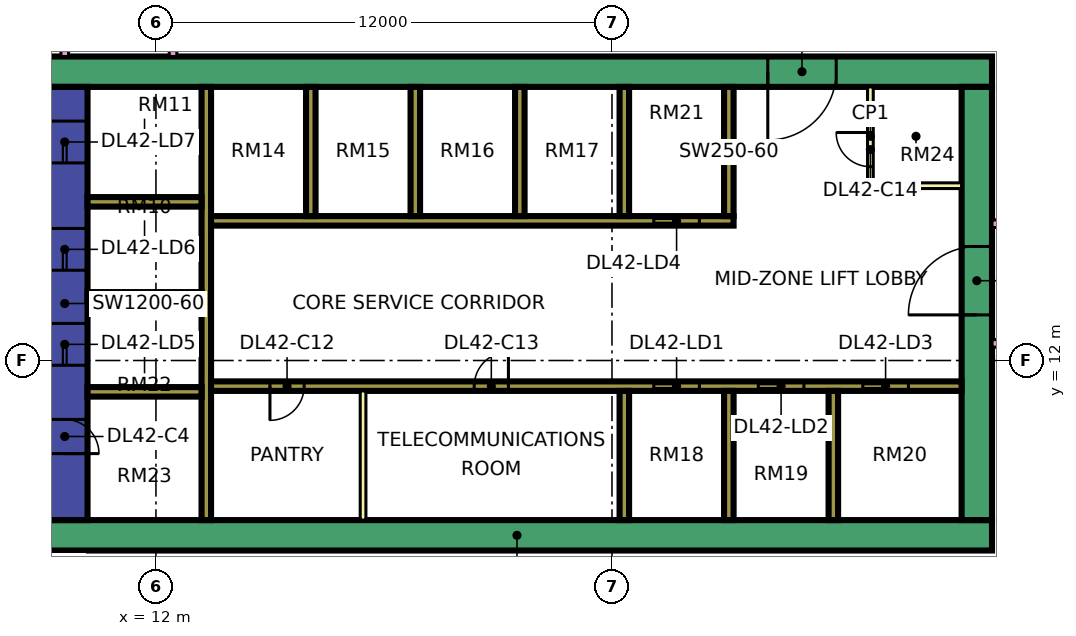
"""IFC4 building model, lengths in metres.
Left out: names, types, materials, properties, quantities, classifications, styles, units other than length and angle.
Written with IfcOpenShell. Run it as: python <this file> out.ifc"""

import sys

from ifc_helpers import new_model, si_unit, direction, frame, frame_2d, origin, place, context, subcontext, project, spatial, rectangle, extrude, element, fill, save


model = new_model("IFC4")
c1 = context("Model", 3, precision=1e-05, world=origin(), true_north=direction((0.0, 1.0)))
c2 = subcontext(c1, "Body", "Model", "MODEL_VIEW")
j1 = project(units=[si_unit("LENGTHUNIT", "METRE"), si_unit("PLANEANGLEUNIT", "RADIAN")], contexts=[c1])
p1 = place(None, origin())
s1 = spatial("IfcSite", under=j1, at=p1, CompositionType="ELEMENT")
p2 = place(p1, origin())
s2 = spatial("IfcBuilding", under=s1, at=p2, CompositionType="ELEMENT")
p3 = place(p2, frame((0.0, 0.0, 183.65)))
s3 = spatial("IfcBuildingStorey", under=s2, at=p3, CompositionType="ELEMENT", Elevation=183.65)
p4 = place(p3, frame((9.0, 7.4, 0.0), z_axis=(0.0, 0.0, 1.0), x_axis=(1.0, 0.0, 0.0)))
e1 = element("IfcWall", 1, at=p4, inside=s3, PredefinedType="SHEAR", context=c2, shape_type="SweptSolid", body=[
    extrude(rectangle(XDim=25.0, YDim=0.8, at=frame_2d((12.5, 0.0))), origin(), (0.0, 0.0, 1.0), 3.75),
])
p5 = place(p3, frame((9.0, 19.6, 0.0), z_axis=(0.0, 0.0, 1.0), x_axis=(1.0, 0.0, 0.0)))
e2 = element("IfcWall", 2, at=p5, inside=s3, PredefinedType="SHEAR", context=c2, shape_type="SweptSolid", body=[
    extrude(rectangle(XDim=25.0, YDim=0.8, at=frame_2d((12.5, 0.0))), origin(), (0.0, 0.0, 1.0), 3.75),
])
p6 = place(p5, frame((19.1, 0.0, 0.0)))
e3 = element("IfcOpeningElement", 3, at=p6, cuts=e2, PredefinedType="OPENING", context=c2, shape_type="SweptSolid", body=[
    extrude(rectangle(XDim=1.8, YDim=2.4, at=frame_2d((0.9, 1.2))), frame((0.0, 0.41, 0.0), z_axis=(0.0, -1.0, 0.0), x_axis=(1.0, 0.0, 0.0)), (0.0, 0.0, 1.0), 0.82),
])
p7 = place(p3, frame((9.6, 7.8, 0.0), z_axis=(0.0, 0.0, 1.0), x_axis=(0.0, 1.0, 0.0)))
e4 = element("IfcWall", 4, at=p7, inside=s3, PredefinedType="SHEAR", context=c2, shape_type="SweptSolid", body=[
    extrude(rectangle(XDim=11.4, YDim=1.2, at=frame_2d((5.7, 0.0))), origin(), (0.0, 0.0, 1.0), 3.75),
])
p8 = place(p7, frame((4.075, 0.0, 0.0)))
e5 = element("IfcOpeningElement", 5, at=p8, cuts=e4, PredefinedType="OPENING", context=c2, shape_type="SweptSolid", body=[
    extrude(rectangle(XDim=1.1, YDim=2.2, at=frame_2d((0.55, 1.1))), frame((0.0, 0.61, 0.0), z_axis=(0.0, -1.0, 0.0), x_axis=(1.0, 0.0, 0.0)), (0.0, 0.0, 1.0), 1.22),
])
p9 = place(p7, frame((6.575, 0.0, 0.0)))
e6 = element("IfcOpeningElement", 6, at=p9, cuts=e4, PredefinedType="OPENING", context=c2, shape_type="SweptSolid", body=[
    extrude(rectangle(XDim=1.1, YDim=2.2, at=frame_2d((0.55, 1.1))), frame((0.0, 0.61, 0.0), z_axis=(0.0, -1.0, 0.0), x_axis=(1.0, 0.0, 0.0)), (0.0, 0.0, 1.0), 1.22),
])
p10 = place(p7, frame((9.4, 0.0, 0.0)))
e7 = element("IfcOpeningElement", 7, at=p10, cuts=e4, PredefinedType="OPENING", context=c2, shape_type="SweptSolid", body=[
    extrude(rectangle(XDim=1.1, YDim=2.2, at=frame_2d((0.55, 1.1))), frame((0.0, 0.61, 0.0), z_axis=(0.0, -1.0, 0.0), x_axis=(1.0, 0.0, 0.0)), (0.0, 0.0, 1.0), 1.22),
])
p11 = place(p7, frame((1.75, 0.0, 0.0)))
e8 = element("IfcOpeningElement", 8, at=p11, cuts=e4, PredefinedType="OPENING", context=c2, shape_type="SweptSolid", body=[
    extrude(rectangle(XDim=0.9, YDim=2.1, at=frame_2d((0.45, 1.05))), frame((0.0, 0.61, 0.0), z_axis=(0.0, -1.0, 0.0), x_axis=(1.0, 0.0, 0.0)), (0.0, 0.0, 1.0), 1.22),
])
p12 = place(p3, frame((33.6, 7.8, 0.0), z_axis=(0.0, 0.0, 1.0), x_axis=(0.0, 1.0, 0.0)))
e9 = element("IfcWall", 9, at=p12, inside=s3, PredefinedType="SHEAR", context=c2, shape_type="SweptSolid", body=[
    extrude(rectangle(XDim=11.4, YDim=0.8, at=frame_2d((5.7, 0.0))), origin(), (0.0, 0.0, 1.0), 3.75),
])
p13 = place(p12, frame((5.4, 0.0, 0.0)))
e10 = element("IfcOpeningElement", 10, at=p13, cuts=e9, PredefinedType="OPENING", context=c2, shape_type="SweptSolid", body=[
    extrude(rectangle(XDim=1.8, YDim=2.4, at=frame_2d((0.9, 1.2))), frame((0.0, 0.41, 0.0), z_axis=(0.0, -1.0, 0.0), x_axis=(1.0, 0.0, 0.0)), (0.0, 0.0, 1.0), 0.82),
])
p14 = place(p3, frame((13.325, 7.8, 0.0), z_axis=(0.0, 0.0, 1.0), x_axis=(0.0, 1.0, 0.0)))
e11 = element("IfcWall", 11, at=p14, inside=s3, PredefinedType="SHEAR", context=c2, shape_type="SweptSolid", body=[
    extrude(rectangle(XDim=11.4, YDim=0.25, at=frame_2d((5.7, 0.0))), origin(), (0.0, 0.0, 1.0), 3.75),
])
p15 = place(p3, frame((13.45, 11.325, 0.0), z_axis=(0.0, 0.0, 1.0), x_axis=(1.0, 0.0, 0.0)))
e12 = element("IfcWall", 12, at=p15, inside=s3, PredefinedType="SHEAR", context=c2, shape_type="SweptSolid", body=[
    extrude(rectangle(XDim=19.75, YDim=0.25, at=frame_2d((9.875, 0.0))), origin(), (0.0, 0.0, 1.0), 3.75),
])
p16 = place(p15, frame((11.65, 0.0, 0.0)))
e13 = element("IfcOpeningElement", 13, at=p16, cuts=e12, PredefinedType="OPENING", context=c2, shape_type="SweptSolid", body=[
    extrude(rectangle(XDim=1.2, YDim=2.2, at=frame_2d((0.6, 1.1))), frame((0.0, 0.135, 0.0), z_axis=(0.0, -1.0, 0.0), x_axis=(1.0, 0.0, 0.0)), (0.0, 0.0, 1.0), 0.27),
])
p17 = place(p15, frame((14.4, 0.0, 0.0)))
e14 = element("IfcOpeningElement", 14, at=p17, cuts=e12, PredefinedType="OPENING", context=c2, shape_type="SweptSolid", body=[
    extrude(rectangle(XDim=1.2, YDim=2.2, at=frame_2d((0.6, 1.1))), frame((0.0, 0.135, 0.0), z_axis=(0.0, -1.0, 0.0), x_axis=(1.0, 0.0, 0.0)), (0.0, 0.0, 1.0), 0.27),
])
p18 = place(p15, frame((17.15, 0.0, 0.0)))
e15 = element("IfcOpeningElement", 15, at=p18, cuts=e12, PredefinedType="OPENING", context=c2, shape_type="SweptSolid", body=[
    extrude(rectangle(XDim=1.2, YDim=2.2, at=frame_2d((0.6, 1.1))), frame((0.0, 0.135, 0.0), z_axis=(0.0, -1.0, 0.0), x_axis=(1.0, 0.0, 0.0)), (0.0, 0.0, 1.0), 0.27),
])
p19 = place(p15, frame((1.55, 0.0, 0.0)))
e16 = element("IfcOpeningElement", 16, at=p19, cuts=e12, PredefinedType="OPENING", context=c2, shape_type="SweptSolid", body=[
    extrude(rectangle(XDim=0.9, YDim=2.1, at=frame_2d((0.45, 1.05))), frame((0.0, 0.135, 0.0), z_axis=(0.0, -1.0, 0.0), x_axis=(1.0, 0.0, 0.0)), (0.0, 0.0, 1.0), 0.27),
])
p20 = place(p15, frame((6.925, 0.0, 0.0)))
e17 = element("IfcOpeningElement", 17, at=p20, cuts=e12, PredefinedType="OPENING", context=c2, shape_type="SweptSolid", body=[
    extrude(rectangle(XDim=0.9, YDim=2.1, at=frame_2d((0.45, 1.05))), frame((0.0, 0.135, 0.0), z_axis=(0.0, -1.0, 0.0), x_axis=(1.0, 0.0, 0.0)), (0.0, 0.0, 1.0), 0.27),
])
p21 = place(p3, frame((13.45, 15.675, 0.0), z_axis=(0.0, 0.0, 1.0), x_axis=(1.0, 0.0, 0.0)))
e18 = element("IfcWall", 18, at=p21, inside=s3, PredefinedType="SHEAR", context=c2, shape_type="SweptSolid", body=[
    extrude(rectangle(XDim=13.75, YDim=0.25, at=frame_2d((6.875, 0.0))), origin(), (0.0, 0.0, 1.0), 3.75),
])
p22 = place(p21, frame((11.65, 0.0, 0.0)))
e19 = element("IfcOpeningElement", 19, at=p22, cuts=e18, PredefinedType="OPENING", context=c2, shape_type="SweptSolid", body=[
    extrude(rectangle(XDim=1.2, YDim=2.2, at=frame_2d((0.6, 1.1))), frame((0.0, 0.135, 0.0), z_axis=(0.0, -1.0, 0.0), x_axis=(1.0, 0.0, 0.0)), (0.0, 0.0, 1.0), 0.27),
])
for number, where, z_axis, x_axis in (
    (20, (10.2, 11.175, 0.0), (0.0, 0.0, 1.0), (1.0, 0.0, 0.0)),
    (21, (10.2, 13.675, 0.0), (0.0, 0.0, 1.0), (1.0, 0.0, 0.0)),
    (22, (10.2, 16.175, 0.0), (0.0, 0.0, 1.0), (1.0, 0.0, 0.0)),
):
    element("IfcWall", number, at=place(p3, frame(where, z_axis=z_axis, x_axis=x_axis)), inside=s3, PredefinedType="SHEAR", context=c2, shape_type="SweptSolid", body=[
        extrude(rectangle(XDim=3.0, YDim=0.25, at=frame_2d((1.5, 0.0))), origin(), (0.0, 0.0, 1.0), 3.75),
    ])
for number, where, z_axis, x_axis in (
    (23, (24.325, 7.8, 0.0), (0.0, 0.0, 1.0), (0.0, 1.0, 0.0)),
    (24, (27.075, 7.8, 0.0), (0.0, 0.0, 1.0), (0.0, 1.0, 0.0)),
    (25, (29.825, 7.8, 0.0), (0.0, 0.0, 1.0), (0.0, 1.0, 0.0)),
    (26, (16.075, 15.8, 0.0), (0.0, 0.0, 1.0), (0.0, 1.0, 0.0)),
    (27, (18.825, 15.8, 0.0), (0.0, 0.0, 1.0), (0.0, 1.0, 0.0)),
    (28, (21.575, 15.8, 0.0), (0.0, 0.0, 1.0), (0.0, 1.0, 0.0)),
    (29, (24.325, 15.8, 0.0), (0.0, 0.0, 1.0), (0.0, 1.0, 0.0)),
    (30, (27.075, 15.8, 0.0), (0.0, 0.0, 1.0), (0.0, 1.0, 0.0)),
):
    element("IfcWall", number, at=place(p3, frame(where, z_axis=z_axis, x_axis=x_axis)), inside=s3, PredefinedType="SHEAR", context=c2, shape_type="SweptSolid", body=[
        extrude(rectangle(XDim=3.4, YDim=0.25, at=frame_2d((1.7, 0.0))), origin(), (0.0, 0.0, 1.0), 3.75),
    ])
p23 = place(p3, frame((-1.447, 12.553, 0.0), z_axis=(0.0, 0.0, 1.0), x_axis=(0.707106781187, -0.707106781187, 0.0)))
e31 = element("IfcWall", 31, at=p23, inside=s3, PredefinedType="SOLIDWALL", context=c2, shape_type="SweptSolid", body=[
    extrude(rectangle(XDim=19.799, YDim=0.15, at=frame_2d((9.899, 0.0))), origin(), (0.0, 0.0, 1.0), 3.35),
])
p24 = place(p23, frame((2.212, 0.0, 0.45)))
e32 = element("IfcOpeningElement", 32, at=p24, cuts=e31, PredefinedType="OPENING", context=c2, shape_type="SweptSolid", body=[
    extrude(rectangle(XDim=3.0, YDim=2.4, at=frame_2d((1.5, 1.2))), frame((0.0, 0.085, 0.0), z_axis=(0.0, -1.0, 0.0), x_axis=(1.0, 0.0, 0.0)), (0.0, 0.0, 1.0), 0.17),
])
p25 = place(p23, frame((10.216, 0.0, 0.45)))
e33 = element("IfcOpeningElement", 33, at=p25, cuts=e31, PredefinedType="OPENING", context=c2, shape_type="SweptSolid", body=[
    extrude(rectangle(XDim=3.0, YDim=2.4, at=frame_2d((1.5, 1.2))), frame((0.0, 0.085, 0.0), z_axis=(0.0, -1.0, 0.0), x_axis=(1.0, 0.0, 0.0)), (0.0, 0.0, 1.0), 0.17),
])
p26 = place(p3, frame((17.45, 7.8, 0.0), z_axis=(0.0, 0.0, 1.0), x_axis=(0.0, 1.0, 0.0)))
e34 = element("IfcWall", 34, at=p26, inside=s3, PredefinedType="PARTITIONING", context=c2, shape_type="SweptSolid", body=[
    extrude(rectangle(XDim=3.4, YDim=0.15, at=frame_2d((1.7, 0.0))), origin(), (0.0, 0.0, 1.0), 3.35),
])
p27 = place(p3, frame((30.8, 16.6, 0.0), z_axis=(0.0, 0.0, 1.0), x_axis=(0.0, 1.0, 0.0)))
e35 = element("IfcWall", 35, at=p27, inside=s3, PredefinedType="PARTITIONING", context=c2, shape_type="SweptSolid", body=[
    extrude(rectangle(XDim=2.6, YDim=0.15, at=frame_2d((1.3, 0.0))), origin(), (0.0, 0.0, 1.0), 3.35),
])
p28 = place(p27, frame((0.5, 0.0, 0.0)))
e36 = element("IfcOpeningElement", 36, at=p28, cuts=e35, PredefinedType="OPENING", context=c2, shape_type="SweptSolid", body=[
    extrude(rectangle(XDim=0.9, YDim=2.1, at=frame_2d((0.45, 1.05))), frame((0.0, 0.085, 0.0), z_axis=(0.0, -1.0, 0.0), x_axis=(1.0, 0.0, 0.0)), (0.0, 0.0, 1.0), 0.17),
])
p29 = place(p3, frame((30.8, 16.6, 0.0), z_axis=(0.0, 0.0, 1.0), x_axis=(1.0, 0.0, 0.0)))
e37 = element("IfcWall", 37, at=p29, inside=s3, PredefinedType="PARTITIONING", context=c2, shape_type="SweptSolid", body=[
    extrude(rectangle(XDim=2.4, YDim=0.15, at=frame_2d((1.2, 0.0))), origin(), (0.0, 0.0, 1.0), 3.35),
])
p30 = place(p3, frame((9.6, 20.0, 0.0), z_axis=(0.0, 0.0, 1.0), x_axis=(0.0, 1.0, 0.0)))
e38 = element("IfcWall", 38, at=p30, inside=s3, PredefinedType="PARTITIONING", context=c2, shape_type="SweptSolid", body=[
    extrude(rectangle(XDim=44.35, YDim=0.2, at=frame_2d((22.175, 0.0))), origin(), (0.0, 0.0, 1.0), 3.35),
])
p31 = place(p30, frame((16.8, 0.0, 0.0)))
e39 = element("IfcOpeningElement", 39, at=p31, cuts=e38, PredefinedType="OPENING", context=c2, shape_type="SweptSolid", body=[
    extrude(rectangle(XDim=1.0, YDim=2.1, at=frame_2d((0.5, 1.05))), frame((0.0, 0.11, 0.0), z_axis=(0.0, -1.0, 0.0), x_axis=(1.0, 0.0, 0.0)), (0.0, 0.0, 1.0), 0.22),
])
p32 = place(p30, frame((40.65, 0.0, 0.0)))
e40 = element("IfcOpeningElement", 40, at=p32, cuts=e38, PredefinedType="OPENING", context=c2, shape_type="SweptSolid", body=[
    extrude(rectangle(XDim=1.0, YDim=2.1, at=frame_2d((0.5, 1.05))), frame((0.0, 0.11, 0.0), z_axis=(0.0, -1.0, 0.0), x_axis=(1.0, 0.0, 0.0)), (0.0, 0.0, 1.0), 0.22),
])
p33 = place(p30, frame((0.6, 0.0, 0.0)))
e41 = element("IfcOpeningElement", 41, at=p33, cuts=e38, PredefinedType="OPENING", context=c2, shape_type="SweptSolid", body=[
    extrude(rectangle(XDim=1.2, YDim=2.1, at=frame_2d((0.6, 1.05))), frame((0.0, 0.11, 0.0), z_axis=(0.0, -1.0, 0.0), x_axis=(1.0, 0.0, 0.0)), (0.0, 0.0, 1.0), 0.22),
])
p34 = place(p30, frame((4.2, 0.0, 0.0)))
e42 = element("IfcOpeningElement", 42, at=p34, cuts=e38, PredefinedType="OPENING", context=c2, shape_type="SweptSolid", body=[
    extrude(rectangle(XDim=1.0, YDim=2.1, at=frame_2d((0.5, 1.05))), frame((0.0, 0.11, 0.0), z_axis=(0.0, -1.0, 0.0), x_axis=(1.0, 0.0, 0.0)), (0.0, 0.0, 1.0), 0.22),
])
p35 = place(p3, frame((12.45, 20.0, 0.0), z_axis=(0.0, 0.0, 1.0), x_axis=(0.0, 1.0, 0.0)))
e43 = element("IfcWall", 43, at=p35, inside=s3, PredefinedType="PARTITIONING", context=c2, shape_type="SweptSolid", body=[
    extrude(rectangle(XDim=42.926, YDim=0.2, at=frame_2d((21.463, 0.0))), origin(), (0.0, 0.0, 1.0), 3.35),
])
p36 = place(p35, frame((5.95, 0.0, 0.0)))
e44 = element("IfcOpeningElement", 44, at=p36, cuts=e43, PredefinedType="OPENING", context=c2, shape_type="SweptSolid", body=[
    extrude(rectangle(XDim=1.0, YDim=2.1, at=frame_2d((0.5, 1.05))), frame((0.0, 0.11, 0.0), z_axis=(0.0, -1.0, 0.0), x_axis=(1.0, 0.0, 0.0)), (0.0, 0.0, 1.0), 0.22),
])
p37 = place(p35, frame((12.0, 0.0, 0.0)))
e45 = element("IfcOpeningElement", 45, at=p37, cuts=e43, PredefinedType="OPENING", context=c2, shape_type="SweptSolid", body=[
    extrude(rectangle(XDim=1.0, YDim=2.1, at=frame_2d((0.5, 1.05))), frame((0.0, 0.11, 0.0), z_axis=(0.0, -1.0, 0.0), x_axis=(1.0, 0.0, 0.0)), (0.0, 0.0, 1.0), 0.22),
])
p38 = place(p35, frame((16.9, 0.0, 0.0)))
e46 = element("IfcOpeningElement", 46, at=p38, cuts=e43, PredefinedType="OPENING", context=c2, shape_type="SweptSolid", body=[
    extrude(rectangle(XDim=1.0, YDim=2.1, at=frame_2d((0.5, 1.05))), frame((0.0, 0.11, 0.0), z_axis=(0.0, -1.0, 0.0), x_axis=(1.0, 0.0, 0.0)), (0.0, 0.0, 1.0), 0.22),
])
p39 = place(p35, frame((34.9, 0.0, 0.0)))
e47 = element("IfcOpeningElement", 47, at=p39, cuts=e43, PredefinedType="OPENING", context=c2, shape_type="SweptSolid", body=[
    extrude(rectangle(XDim=1.0, YDim=2.1, at=frame_2d((0.5, 1.05))), frame((0.0, 0.11, 0.0), z_axis=(0.0, -1.0, 0.0), x_axis=(1.0, 0.0, 0.0)), (0.0, 0.0, 1.0), 0.22),
])
p40 = place(p35, frame((1.15, 0.0, 0.0)))
e48 = element("IfcOpeningElement", 48, at=p40, cuts=e43, PredefinedType="OPENING", context=c2, shape_type="SweptSolid", body=[
    extrude(rectangle(XDim=1.8, YDim=2.1, at=frame_2d((0.9, 1.05))), frame((0.0, 0.11, 0.0), z_axis=(0.0, -1.0, 0.0), x_axis=(1.0, 0.0, 0.0)), (0.0, 0.0, 1.0), 0.22),
])
p41 = place(p35, frame((28.6, 0.0, 0.0)))
e49 = element("IfcOpeningElement", 49, at=p41, cuts=e43, PredefinedType="OPENING", context=c2, shape_type="SweptSolid", body=[
    extrude(rectangle(XDim=1.8, YDim=2.1, at=frame_2d((0.9, 1.05))), frame((0.0, 0.11, 0.0), z_axis=(0.0, -1.0, 0.0), x_axis=(1.0, 0.0, 0.0)), (0.0, 0.0, 1.0), 0.22),
])
p42 = place(p3, frame((34.0, 12.45, 0.0), z_axis=(0.0, 0.0, 1.0), x_axis=(1.0, 0.0, 0.0)))
e50 = element("IfcWall", 50, at=p42, inside=s3, PredefinedType="PARTITIONING", context=c2, shape_type="SweptSolid", body=[
    extrude(rectangle(XDim=2.451, YDim=0.2, at=frame_2d((1.226, 0.0))), origin(), (0.0, 0.0, 1.0), 3.35),
])
p43 = place(p3, frame((34.0, 15.6, 0.0), z_axis=(0.0, 0.0, 1.0), x_axis=(1.0, 0.0, 0.0)))
e51 = element("IfcWall", 51, at=p43, inside=s3, PredefinedType="PARTITIONING", context=c2, shape_type="SweptSolid", body=[
    extrude(rectangle(XDim=10.35, YDim=0.2, at=frame_2d((5.175, 0.0))), origin(), (0.0, 0.0, 1.0), 3.35),
])
p44 = place(p43, frame((5.6, 0.0, 0.0)))
e52 = element("IfcOpeningElement", 52, at=p44, cuts=e51, PredefinedType="OPENING", context=c2, shape_type="SweptSolid", body=[
    extrude(rectangle(XDim=1.0, YDim=2.1, at=frame_2d((0.5, 1.05))), frame((0.0, 0.11, 0.0), z_axis=(0.0, -1.0, 0.0), x_axis=(1.0, 0.0, 0.0)), (0.0, 0.0, 1.0), 0.22),
])
p45 = place(p43, frame((0.45, 0.0, 0.0)))
e53 = element("IfcOpeningElement", 53, at=p45, cuts=e51, PredefinedType="OPENING", context=c2, shape_type="SweptSolid", body=[
    extrude(rectangle(XDim=1.2, YDim=2.1, at=frame_2d((0.6, 1.05))), frame((0.0, 0.11, 0.0), z_axis=(0.0, -1.0, 0.0), x_axis=(1.0, 0.0, 0.0)), (0.0, 0.0, 1.0), 0.22),
])
p46 = place(p16, origin())
e54 = element("IfcDoor", 54, at=p46, inside=s3, OperationType="DOUBLE_DOOR_SLIDING", PredefinedType="DOOR", context=c2, shape_type="SweptSolid", body=[
    extrude(rectangle(XDim=1.2, YDim=2.2, at=frame_2d((0.6, 1.1))), frame((0.0, 0.025, 0.0), z_axis=(0.0, -1.0, 0.0), x_axis=(1.0, 0.0, 0.0)), (0.0, 0.0, 1.0), 0.05),
])
fill(e13, e54)
p47 = place(p17, origin())
e55 = element("IfcDoor", 55, at=p47, inside=s3, OperationType="DOUBLE_DOOR_SLIDING", PredefinedType="DOOR", context=c2, shape_type="SweptSolid", body=[
    extrude(rectangle(XDim=1.2, YDim=2.2, at=frame_2d((0.6, 1.1))), frame((0.0, 0.025, 0.0), z_axis=(0.0, -1.0, 0.0), x_axis=(1.0, 0.0, 0.0)), (0.0, 0.0, 1.0), 0.05),
])
fill(e14, e55)
p48 = place(p18, origin())
e56 = element("IfcDoor", 56, at=p48, inside=s3, OperationType="DOUBLE_DOOR_SLIDING", PredefinedType="DOOR", context=c2, shape_type="SweptSolid", body=[
    extrude(rectangle(XDim=1.2, YDim=2.2, at=frame_2d((0.6, 1.1))), frame((0.0, 0.025, 0.0), z_axis=(0.0, -1.0, 0.0), x_axis=(1.0, 0.0, 0.0)), (0.0, 0.0, 1.0), 0.05),
])
fill(e15, e56)
p49 = place(p22, origin())
e57 = element("IfcDoor", 57, at=p49, inside=s3, OperationType="DOUBLE_DOOR_SLIDING", PredefinedType="DOOR", context=c2, shape_type="SweptSolid", body=[
    extrude(rectangle(XDim=1.2, YDim=2.2, at=frame_2d((0.6, 1.1))), frame((0.0, 0.025, 0.0), z_axis=(0.0, -1.0, 0.0), x_axis=(1.0, 0.0, 0.0)), (0.0, 0.0, 1.0), 0.05),
])
fill(e19, e57)
p50 = place(p8, origin())
e58 = element("IfcDoor", 58, at=p50, inside=s3, OperationType="DOUBLE_DOOR_SLIDING", PredefinedType="DOOR", context=c2, shape_type="SweptSolid", body=[
    extrude(rectangle(XDim=1.1, YDim=2.2, at=frame_2d((0.55, 1.1))), frame((0.0, 0.025, 0.0), z_axis=(0.0, -1.0, 0.0), x_axis=(1.0, 0.0, 0.0)), (0.0, 0.0, 1.0), 0.05),
])
fill(e5, e58)
p51 = place(p9, origin())
e59 = element("IfcDoor", 59, at=p51, inside=s3, OperationType="DOUBLE_DOOR_SLIDING", PredefinedType="DOOR", context=c2, shape_type="SweptSolid", body=[
    extrude(rectangle(XDim=1.1, YDim=2.2, at=frame_2d((0.55, 1.1))), frame((0.0, 0.025, 0.0), z_axis=(0.0, -1.0, 0.0), x_axis=(1.0, 0.0, 0.0)), (0.0, 0.0, 1.0), 0.05),
])
fill(e6, e59)
p52 = place(p10, origin())
e60 = element("IfcDoor", 60, at=p52, inside=s3, OperationType="DOUBLE_DOOR_SLIDING", PredefinedType="DOOR", context=c2, shape_type="SweptSolid", body=[
    extrude(rectangle(XDim=1.1, YDim=2.2, at=frame_2d((0.55, 1.1))), frame((0.0, 0.025, 0.0), z_axis=(0.0, -1.0, 0.0), x_axis=(1.0, 0.0, 0.0)), (0.0, 0.0, 1.0), 0.05),
])
fill(e7, e60)
p53 = place(p13, origin())
e61 = element("IfcDoor", 61, at=p53, inside=s3, OperationType="DOUBLE_DOOR_SINGLE_SWING", PredefinedType="DOOR", context=c2, shape_type="SweptSolid", body=[
    extrude(rectangle(XDim=1.8, YDim=2.4, at=frame_2d((0.9, 1.2))), frame((0.0, 0.025, 0.0), z_axis=(0.0, -1.0, 0.0), x_axis=(1.0, 0.0, 0.0)), (0.0, 0.0, 1.0), 0.05),
])
fill(e10, e61)
p54 = place(p6, frame((1.8, 0.0, 0.0), z_axis=(0.0, 0.0, 1.0), x_axis=(-1.0, 0.0, 0.0)))
e62 = element("IfcDoor", 62, at=p54, inside=s3, OperationType="DOUBLE_DOOR_SINGLE_SWING", PredefinedType="DOOR", context=c2, shape_type="SweptSolid", body=[
    extrude(rectangle(XDim=1.8, YDim=2.4, at=frame_2d((0.9, 1.2))), frame((0.0, 0.025, 0.0), z_axis=(0.0, -1.0, 0.0), x_axis=(1.0, 0.0, 0.0)), (0.0, 0.0, 1.0), 0.05),
])
fill(e3, e62)
p55 = place(p11, frame((0.9, 0.0, 0.0), z_axis=(0.0, 0.0, 1.0), x_axis=(-1.0, 0.0, 0.0)))
e63 = element("IfcDoor", 63, at=p55, inside=s3, OperationType="SINGLE_SWING_LEFT", PredefinedType="DOOR", context=c2, shape_type="SweptSolid", body=[
    extrude(rectangle(XDim=0.9, YDim=2.1, at=frame_2d((0.45, 1.05))), frame((0.0, 0.025, 0.0), z_axis=(0.0, -1.0, 0.0), x_axis=(1.0, 0.0, 0.0)), (0.0, 0.0, 1.0), 0.05),
])
fill(e8, e63)
p56 = place(p19, frame((0.9, 0.0, 0.0), z_axis=(0.0, 0.0, 1.0), x_axis=(-1.0, 0.0, 0.0)))
e64 = element("IfcDoor", 64, at=p56, inside=s3, OperationType="SINGLE_SWING_LEFT", PredefinedType="DOOR", context=c2, shape_type="SweptSolid", body=[
    extrude(rectangle(XDim=0.9, YDim=2.1, at=frame_2d((0.45, 1.05))), frame((0.0, 0.025, 0.0), z_axis=(0.0, -1.0, 0.0), x_axis=(1.0, 0.0, 0.0)), (0.0, 0.0, 1.0), 0.05),
])
fill(e16, e64)
p57 = place(p20, frame((0.9, 0.0, 0.0), z_axis=(0.0, 0.0, 1.0), x_axis=(-1.0, 0.0, 0.0)))
e65 = element("IfcDoor", 65, at=p57, inside=s3, OperationType="SINGLE_SWING_RIGHT", PredefinedType="DOOR", context=c2, shape_type="SweptSolid", body=[
    extrude(rectangle(XDim=0.9, YDim=2.1, at=frame_2d((0.45, 1.05))), frame((0.0, 0.025, 0.0), z_axis=(0.0, -1.0, 0.0), x_axis=(1.0, 0.0, 0.0)), (0.0, 0.0, 1.0), 0.05),
])
fill(e17, e65)
p58 = place(p28, frame((0.9, 0.0, 0.0), z_axis=(0.0, 0.0, 1.0), x_axis=(-1.0, 0.0, 0.0)))
e66 = element("IfcDoor", 66, at=p58, inside=s3, OperationType="SINGLE_SWING_RIGHT", PredefinedType="DOOR", context=c2, shape_type="SweptSolid", body=[
    extrude(rectangle(XDim=0.9, YDim=2.1, at=frame_2d((0.45, 1.05))), frame((0.0, 0.025, 0.0), z_axis=(0.0, -1.0, 0.0), x_axis=(1.0, 0.0, 0.0)), (0.0, 0.0, 1.0), 0.05),
])
fill(e36, e66)
save(model, sys.argv[1])
